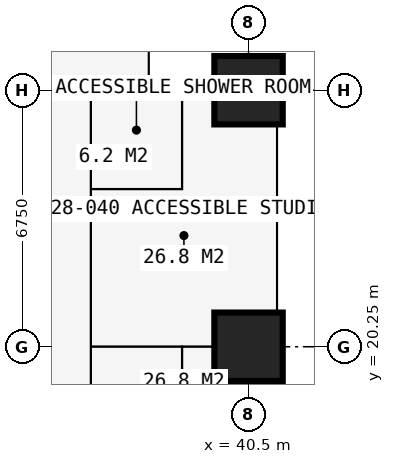
"""IFC4 building model, lengths in metres.
Left out: names, types, materials, properties, quantities, classifications, styles, units other than length and angle.
Written with IfcOpenShell. Run it as: python <this file> out.ifc"""

import sys

from ifc_helpers import new_model, si_unit, direction, frame, frame_2d, origin, origin_2d, place, context, subcontext, project, spatial, rectangle, extrude, element, fill, save


model = new_model("IFC4")
c1 = context("Model", 3, precision=1e-05, world=origin(), true_north=direction((0.0, 1.0)))
c2 = subcontext(c1, "Body", "Model", "MODEL_VIEW")
j1 = project(units=[si_unit("LENGTHUNIT", "METRE"), si_unit("PLANEANGLEUNIT", "RADIAN")], contexts=[c1])
p1 = place(None, origin())
s1 = spatial("IfcSite", under=j1, at=p1, CompositionType="ELEMENT")
p2 = place(p1, origin())
s2 = spatial("IfcBuilding", under=s1, at=p2, CompositionType="ELEMENT")
p3 = place(p2, frame((0.0, 0.0, 105.3)))
s3 = spatial("IfcBuildingStorey", under=s2, at=p3, CompositionType="ELEMENT", Elevation=105.3)
for number, where, z_axis, x_axis in (
    (1, (40.5, 20.25, 0.0), (0.0, 0.0, 1.0), (1.0, 0.0, 0.0)),
    (2, (40.5, 27.0, 0.0), (0.0, 0.0, 1.0), (1.0, 0.0, 0.0)),
):
    element("IfcColumn", number, at=place(p3, frame(where, z_axis=z_axis, x_axis=x_axis)), inside=s3, PredefinedType="COLUMN", context=c2, shape_type="SweptSolid", body=[
        extrude(rectangle(XDim=1.8, YDim=1.8, at=origin_2d()), origin(), (0.0, 0.0, 1.0), 3.6),
    ])
p4 = place(p3, frame((41.25, 27.75, 0.0), z_axis=(0.0, 0.0, 1.0), x_axis=(-1.0, 0.0, 0.0)))
e3 = element("IfcWall", 3, at=p4, inside=s3, PredefinedType="SOLIDWALL", context=c2, shape_type="SweptSolid", body=[
    extrude(rectangle(XDim=3.375, YDim=0.3, at=frame_2d((1.688, 0.0))), origin(), (0.0, 0.0, 1.0), 3.375),
])
p5 = place(p4, frame((1.833, 0.0, 0.9)))
e4 = element("IfcOpeningElement", 4, at=p5, cuts=e3, PredefinedType="OPENING", context=c2, shape_type="SweptSolid", body=[
    extrude(rectangle(XDim=1.2, YDim=1.8, at=frame_2d((0.6, 0.9))), frame((0.0, 0.16, 0.0), z_axis=(0.0, -1.0, 0.0), x_axis=(1.0, 0.0, 0.0)), (0.0, 0.0, 1.0), 0.32),
])
p6 = place(p3, frame((37.875, 27.75, 0.0), z_axis=(0.0, 0.0, 1.0), x_axis=(0.0, 1.0, 0.0)))
e5 = element("IfcWall", 5, at=p6, inside=s3, PredefinedType="SOLIDWALL", context=c2, shape_type="SweptSolid", body=[
    extrude(rectangle(XDim=3.375, YDim=0.3, at=frame_2d((1.688, 0.0))), origin(), (0.0, 0.0, 1.0), 3.375),
])
p7 = place(p6, frame((0.788, 0.0, 0.6)))
e6 = element("IfcOpeningElement", 6, at=p7, cuts=e5, PredefinedType="OPENING", context=c2, shape_type="SweptSolid", body=[
    extrude(rectangle(XDim=1.8, YDim=2.1, at=frame_2d((0.9, 1.05))), frame((0.0, 0.16, 0.0), z_axis=(0.0, -1.0, 0.0), x_axis=(1.0, 0.0, 0.0)), (0.0, 0.0, 1.0), 0.32),
])
p8 = place(p3, frame((36.35, 6.75, 0.0), z_axis=(0.0, 0.0, 1.0), x_axis=(0.0, 1.0, 0.0)))
e7 = element("IfcWall", 7, at=p8, inside=s3, PredefinedType="PARTITIONING", context=c2, shape_type="SweptSolid", body=[
    extrude(rectangle(XDim=20.25, YDim=0.15, at=frame_2d((10.125, 0.0))), origin(), (0.0, 0.0, 1.0), 3.375),
])
p9 = place(p8, frame((0.2, 0.0, 0.0)))
e8 = element("IfcOpeningElement", 8, at=p9, cuts=e7, PredefinedType="OPENING", context=c2, shape_type="SweptSolid", body=[
    extrude(rectangle(XDim=0.95, YDim=2.2, at=frame_2d((0.475, 1.1))), frame((0.0, 0.085, 0.0), z_axis=(0.0, -1.0, 0.0), x_axis=(1.0, 0.0, 0.0)), (0.0, 0.0, 1.0), 0.17),
])
p10 = place(p8, frame((15.1, 0.0, 0.0)))
e9 = element("IfcOpeningElement", 9, at=p10, cuts=e7, PredefinedType="OPENING", context=c2, shape_type="SweptSolid", body=[
    extrude(rectangle(XDim=0.95, YDim=2.2, at=frame_2d((0.475, 1.1))), frame((0.0, 0.085, 0.0), z_axis=(0.0, -1.0, 0.0), x_axis=(1.0, 0.0, 0.0)), (0.0, 0.0, 1.0), 0.17),
])
p11 = place(p8, frame((8.35, 0.0, 0.0)))
e10 = element("IfcOpeningElement", 10, at=p11, cuts=e7, PredefinedType="OPENING", context=c2, shape_type="SweptSolid", body=[
    extrude(rectangle(XDim=0.95, YDim=2.2, at=frame_2d((0.475, 1.1))), frame((0.0, 0.085, 0.0), z_axis=(0.0, -1.0, 0.0), x_axis=(1.0, 0.0, 0.0)), (0.0, 0.0, 1.0), 0.17),
])
p12 = place(p8, frame((3.575, 0.0, 0.0)))
e11 = element("IfcOpeningElement", 11, at=p12, cuts=e7, PredefinedType="OPENING", context=c2, shape_type="SweptSolid", body=[
    extrude(rectangle(XDim=0.95, YDim=2.2, at=frame_2d((0.475, 1.1))), frame((0.0, 0.085, 0.0), z_axis=(0.0, -1.0, 0.0), x_axis=(1.0, 0.0, 0.0)), (0.0, 0.0, 1.0), 0.17),
])
p13 = place(p3, frame((36.35, 20.25, 0.0), z_axis=(0.0, 0.0, 1.0), x_axis=(1.0, 0.0, 0.0)))
e12 = element("IfcWall", 12, at=p13, inside=s3, PredefinedType="PARTITIONING", context=c2, shape_type="SweptSolid", body=[
    extrude(rectangle(XDim=4.884, YDim=0.175, at=frame_2d((2.442, 0.0))), origin(), (0.0, 0.0, 1.0), 2.61),
])
p14 = place(p13, frame((0.75, 0.0, 0.0)))
e13 = element("IfcOpeningElement", 13, at=p14, cuts=e12, PredefinedType="OPENING", context=c2, shape_type="SweptSolid", body=[
    extrude(rectangle(XDim=0.9, YDim=2.2, at=frame_2d((0.45, 1.1))), frame((0.0, 0.097, 0.0), z_axis=(0.0, -1.0, 0.0), x_axis=(1.0, 0.0, 0.0)), (0.0, 0.0, 1.0), 0.195),
])
p15 = place(p3, frame((36.35, 24.4, 0.0), z_axis=(0.0, 0.0, 1.0), x_axis=(1.0, 0.0, 0.0)))
e14 = element("IfcWall", 14, at=p15, inside=s3, PredefinedType="PARTITIONING", context=c2, shape_type="SweptSolid", body=[
    extrude(rectangle(XDim=2.4, YDim=0.1, at=frame_2d((1.2, 0.0))), origin(), (0.0, 0.0, 1.0), 3.375),
])
p16 = place(p3, frame((36.35, 27.0, 0.0), z_axis=(0.0, 0.0, 1.0), x_axis=(1.0, 0.0, 0.0)))
e15 = element("IfcWall", 15, at=p16, inside=s3, PredefinedType="PARTITIONING", context=c2, shape_type="SweptSolid", body=[
    extrude(rectangle(XDim=4.884, YDim=0.175, at=frame_2d((2.442, 0.0))), origin(), (0.0, 0.0, 1.0), 2.877),
])
p17 = place(p3, frame((37.875, 27.0, 0.0), z_axis=(0.0, 0.0, 1.0), x_axis=(0.0, 1.0, 0.0)))
e16 = element("IfcWall", 16, at=p17, inside=s3, PredefinedType="PARTITIONING", context=c2, shape_type="SweptSolid", body=[
    extrude(rectangle(XDim=0.734, YDim=0.15, at=frame_2d((0.367, 0.0))), origin(), (0.0, 0.0, 1.0), 3.375),
])
p18 = place(p3, frame((38.75, 17.65, 0.0), z_axis=(0.0, 0.0, 1.0), x_axis=(0.0, 1.0, 0.0)))
e17 = element("IfcWall", 17, at=p18, inside=s3, PredefinedType="PARTITIONING", context=c2, shape_type="SweptSolid", body=[
    extrude(rectangle(XDim=2.6, YDim=0.1, at=frame_2d((1.3, 0.0))), origin(), (0.0, 0.0, 1.0), 3.375),
])
p19 = place(p3, frame((38.75, 24.4, 0.0), z_axis=(0.0, 0.0, 1.0), x_axis=(0.0, 1.0, 0.0)))
e18 = element("IfcWall", 18, at=p19, inside=s3, PredefinedType="PARTITIONING", context=c2, shape_type="SweptSolid", body=[
    extrude(rectangle(XDim=2.6, YDim=0.1, at=frame_2d((1.3, 0.0))), origin(), (0.0, 0.0, 1.0), 3.375),
])
p20 = place(p19, frame((0.8, 0.0, 0.0)))
e19 = element("IfcOpeningElement", 19, at=p20, cuts=e18, PredefinedType="OPENING", context=c2, shape_type="SweptSolid", body=[
    extrude(rectangle(XDim=0.9, YDim=2.2, at=frame_2d((0.45, 1.1))), frame((0.0, 0.06, 0.0), z_axis=(0.0, -1.0, 0.0), x_axis=(1.0, 0.0, 0.0)), (0.0, 0.0, 1.0), 0.12),
])
p21 = place(p5, origin())
e20 = element("IfcWindow", 20, at=p21, inside=s3, PartitioningType="SINGLE_PANEL", PredefinedType="WINDOW", context=c2, shape_type="SweptSolid", body=[
    extrude(rectangle(XDim=1.2, YDim=1.8, at=frame_2d((0.6, 0.9))), frame((0.0, 0.03, 0.0), z_axis=(0.0, -1.0, 0.0), x_axis=(1.0, 0.0, 0.0)), (0.0, 0.0, 1.0), 0.06),
])
fill(e4, e20)
p22 = place(p10, origin())
e21 = element("IfcDoor", 21, at=p22, inside=s3, OperationType="SINGLE_SWING_LEFT", PredefinedType="DOOR", context=c2, shape_type="SweptSolid", body=[
    extrude(rectangle(XDim=0.95, YDim=2.2, at=frame_2d((0.475, 1.1))), frame((0.0, 0.025, 0.0), z_axis=(0.0, -1.0, 0.0), x_axis=(1.0, 0.0, 0.0)), (0.0, 0.0, 1.0), 0.05),
])
fill(e9, e21)
p23 = place(p20, origin())
e22 = element("IfcDoor", 22, at=p23, inside=s3, OperationType="SINGLE_SWING_RIGHT", PredefinedType="DOOR", context=c2, shape_type="SweptSolid", body=[
    extrude(rectangle(XDim=0.9, YDim=2.2, at=frame_2d((0.45, 1.1))), frame((0.0, 0.025, 0.0), z_axis=(0.0, -1.0, 0.0), x_axis=(1.0, 0.0, 0.0)), (0.0, 0.0, 1.0), 0.05),
])
fill(e19, e22)
p24 = place(p14, origin())
e23 = element("IfcDoor", 23, at=p24, inside=s3, OperationType="SINGLE_SWING_RIGHT", PredefinedType="DOOR", context=c2, shape_type="SweptSolid", body=[
    extrude(rectangle(XDim=0.9, YDim=2.2, at=frame_2d((0.45, 1.1))), frame((0.0, 0.025, 0.0), z_axis=(0.0, -1.0, 0.0), x_axis=(1.0, 0.0, 0.0)), (0.0, 0.0, 1.0), 0.05),
])
fill(e13, e23)
save(model, sys.argv[1])
